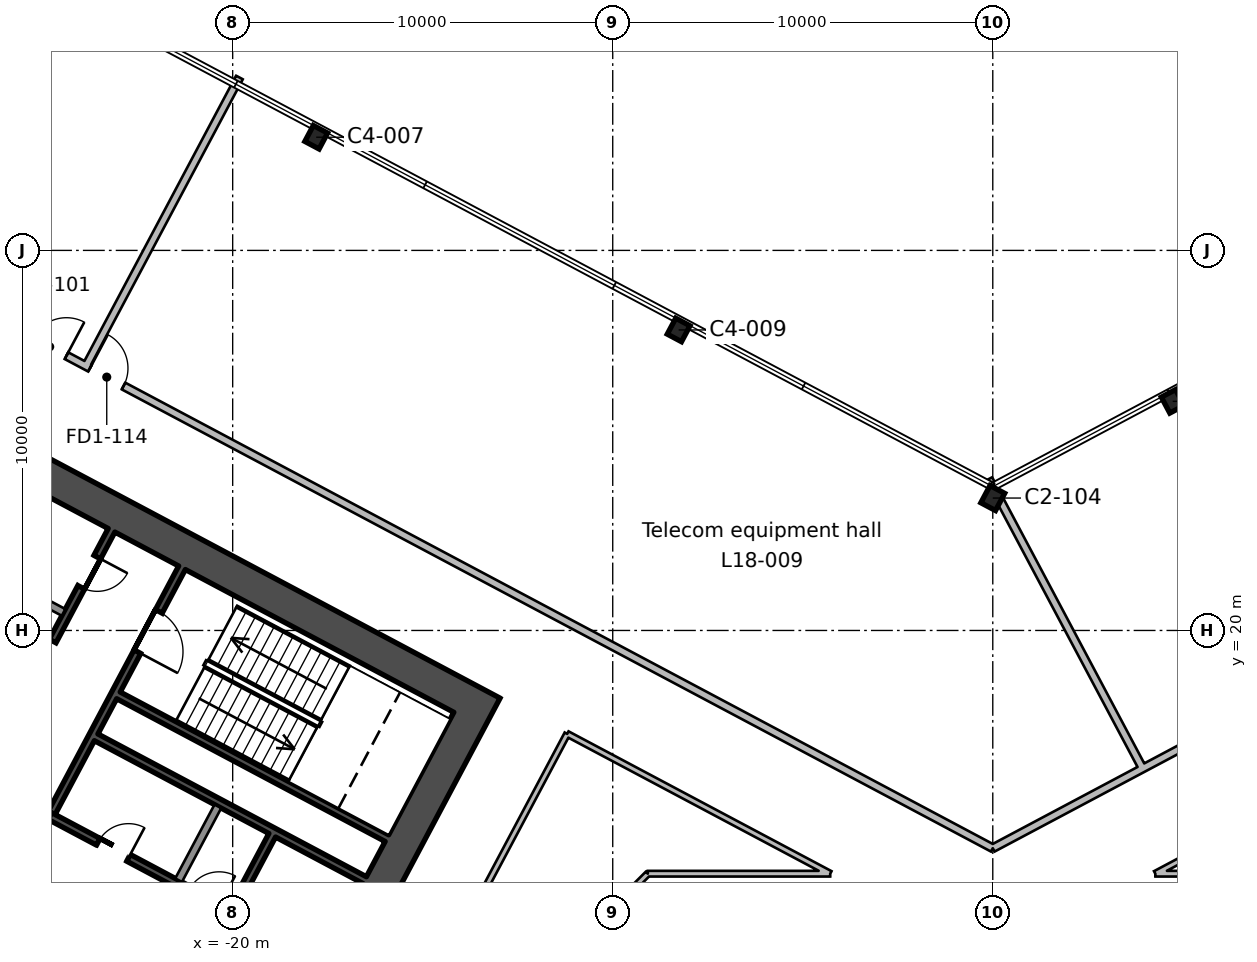
"""IFC4 building model, lengths in metres.
Left out: names, types, materials, properties, quantities, classifications, styles, units other than length and angle.
Written with IfcOpenShell. Run it as: python <this file> out.ifc"""

import sys

from ifc_helpers import new_model, si_unit, direction, frame, frame_2d, origin, origin_2d, place, context, subcontext, project, spatial, rectangle, i_section, extrude, element, fill, save


model = new_model("IFC4")
c1 = context("Model", 3, precision=1e-05, world=origin(), true_north=direction((0.0, 1.0)))
c2 = subcontext(c1, "Body", "Model", "MODEL_VIEW")
j1 = project(units=[si_unit("LENGTHUNIT", "METRE"), si_unit("PLANEANGLEUNIT", "RADIAN")], contexts=[c1])
p1 = place(None, origin())
s1 = spatial("IfcSite", under=j1, at=p1, CompositionType="ELEMENT")
p2 = place(p1, origin())
s2 = spatial("IfcBuilding", under=s1, at=p2, CompositionType="ELEMENT")
p3 = place(p2, frame((0.0, 0.0, 93.8)))
s3 = spatial("IfcBuildingStorey", under=s2, at=p3, CompositionType="ELEMENT", Elevation=93.8)
p4 = place(p3, frame((0.0, 23.484, 0.0), z_axis=(0.0, 0.0, 1.0), x_axis=(-0.882947592859, 0.469471562786, 0.0)))
e1 = element("IfcColumn", 1, at=p4, inside=s3, PredefinedType="COLUMN", context=c2, shape_type="SweptSolid", body=[
    extrude(i_section(OverallWidth=0.437, OverallDepth=0.513, WebThickness=0.061, FlangeThickness=0.097, FilletRadius=0.015, at=origin_2d()), origin(), (0.0, 0.0, 1.0), 4.6),
])
for number, where, z_axis, x_axis in (
    (2, (4.734, 26.029, 0.0), (0.0, 0.0, 1.0), (-0.883, -0.469, 0.0)),
    (3, (-8.266, 27.907, 0.0), (0.0, 0.0, 1.0), (-0.883, 0.469, 0.0)),
    (4, (-17.802, 32.978, 0.0), (0.0, 0.0, 1.0), (-0.883, 0.469, 0.0)),
):
    element("IfcColumn", number, at=place(p3, frame(where, z_axis=z_axis, x_axis=x_axis)), inside=s3, PredefinedType="COLUMN", context=c2, shape_type="SweptSolid", body=[
        extrude(i_section(OverallWidth=0.424, OverallDepth=0.475, WebThickness=0.048, FlangeThickness=0.077, FilletRadius=0.015, at=origin_2d()), origin(), (0.0, 0.0, 1.0), 4.6),
    ])
p5 = place(p3, frame((-13.362, 18.43, 0.0), z_axis=(0.0, 0.0, 1.0), x_axis=(-0.46947084998, -0.882947971864, 0.0)))
e5 = element("IfcWall", 5, at=p5, inside=s3, PredefinedType="SHEAR", context=c2, shape_type="SweptSolid", body=[
    extrude(rectangle(XDim=20.0, YDim=0.9, at=frame_2d((10.0, 0.0))), origin(), (0.0, 0.0, 1.0), 4.6),
])
p6 = place(p5, frame((7.0, 0.0, 0.0)))
e6 = element("IfcOpeningElement", 6, at=p6, cuts=e5, PredefinedType="OPENING", context=c2, shape_type="SweptSolid", body=[
    extrude(rectangle(XDim=2.4, YDim=2.4, at=frame_2d((1.2, 1.2))), frame((0.0, 0.46, 0.0), z_axis=(0.0, -1.0, 0.0), x_axis=(1.0, 0.0, 0.0)), (0.0, 0.0, 1.0), 0.92),
])
p7 = place(p3, frame((-13.97, 18.244, 0.0), z_axis=(0.0, 0.0, 1.0), x_axis=(-0.88294509198, 0.469476266226, 0.0)))
e7 = element("IfcWall", 7, at=p7, inside=s3, PredefinedType="SHEAR", context=c2, shape_type="SweptSolid", body=[
    extrude(rectangle(XDim=20.2, YDim=0.9, at=frame_2d((10.1, 0.0))), origin(), (0.0, 0.0, 1.0), 4.6),
])
p8 = place(p3, frame((-18.96, 14.611, 0.0), z_axis=(0.0, 0.0, 1.0), x_axis=(-0.4694473164, -0.882960484464, 0.0)))
e8 = element("IfcWall", 8, at=p8, inside=s3, PredefinedType="SHEAR", context=c2, shape_type="SweptSolid", body=[
    extrude(rectangle(XDim=2.2, YDim=0.2, at=frame_2d((1.1, 0.0))), origin(), (0.0, 0.0, 1.0), 4.6),
])
p9 = place(p3, frame((-20.39, 15.372, 0.0), z_axis=(0.0, 0.0, 1.0), x_axis=(-0.4694473164, -0.882960484464, 0.0)))
e9 = element("IfcWall", 9, at=p9, inside=s3, PredefinedType="SOLIDWALL", context=c2, shape_type="SweptSolid", body=[
    extrude(rectangle(XDim=2.2, YDim=0.2, at=frame_2d((1.1, 0.0))), origin(), (0.0, 0.0, 1.0), 4.6),
])
p10 = place(p3, frame((-21.333, 21.649, 0.0), z_axis=(0.0, 0.0, 1.0), x_axis=(-0.469494272526, -0.882935517501, 0.0)))
e10 = element("IfcWall", 10, at=p10, inside=s3, PredefinedType="SHEAR", context=c2, shape_type="SweptSolid", body=[
    extrude(rectangle(XDim=7.3, YDim=0.2, at=frame_2d((3.65, 0.0))), origin(), (0.0, 0.0, 1.0), 4.6),
])
p11 = place(p10, frame((1.3, 0.0, 0.0)))
e11 = element("IfcOpeningElement", 11, at=p11, cuts=e10, PredefinedType="OPENING", context=c2, shape_type="SweptSolid", body=[
    extrude(rectangle(XDim=1.2, YDim=2.1, at=frame_2d((0.6, 1.05))), frame((0.0, 0.11, 0.0), z_axis=(0.0, -1.0, 0.0), x_axis=(1.0, 0.0, 0.0)), (0.0, 0.0, 1.0), 0.22),
])
p12 = place(p3, frame((-23.188, 22.635, 0.0), z_axis=(0.0, 0.0, 1.0), x_axis=(-0.469454336211, -0.882956752176, 0.0)))
e12 = element("IfcWall", 12, at=p12, inside=s3, PredefinedType="SHEAR", context=c2, shape_type="SweptSolid", body=[
    extrude(rectangle(XDim=7.3, YDim=0.2, at=frame_2d((3.65, 0.0))), origin(), (0.0, 0.0, 1.0), 4.6),
])
p13 = place(p12, frame((0.8, 0.0, 0.0)))
e13 = element("IfcOpeningElement", 13, at=p13, cuts=e12, PredefinedType="OPENING", context=c2, shape_type="SweptSolid", body=[
    extrude(rectangle(XDim=0.9, YDim=2.1, at=frame_2d((0.45, 1.05))), frame((0.0, 0.11, 0.0), z_axis=(0.0, -1.0, 0.0), x_axis=(1.0, 0.0, 0.0)), (0.0, 0.0, 1.0), 0.22),
])
p14 = place(p12, frame((3.3, 0.0, 0.0)))
e14 = element("IfcOpeningElement", 14, at=p14, cuts=e12, PredefinedType="OPENING", context=c2, shape_type="SweptSolid", body=[
    extrude(rectangle(XDim=0.9, YDim=2.1, at=frame_2d((0.45, 1.05))), frame((0.0, 0.11, 0.0), z_axis=(0.0, -1.0, 0.0), x_axis=(1.0, 0.0, 0.0)), (0.0, 0.0, 1.0), 0.22),
])
p15 = place(p3, frame((-24.449, 20.475, 0.0), z_axis=(0.0, 0.0, 1.0), x_axis=(-0.882934506056, 0.469496174655, 0.0)))
e15 = element("IfcWall", 15, at=p15, inside=s3, PredefinedType="SOLIDWALL", context=c2, shape_type="SweptSolid", body=[
    extrude(rectangle(XDim=5.2, YDim=0.2, at=frame_2d((2.6, 0.0))), origin(), (0.0, 0.0, 1.0), 4.6),
])
p16 = place(p3, frame((-15.942, 14.536, 0.0), z_axis=(0.0, 0.0, 1.0), x_axis=(-0.882946947542, 0.469472776449, 0.0)))
e16 = element("IfcWall", 16, at=p16, inside=s3, PredefinedType="SHEAR", context=c2, shape_type="SweptSolid", body=[
    extrude(rectangle(XDim=8.0, YDim=0.2, at=frame_2d((4.0, 0.0))), origin(), (0.0, 0.0, 1.0), 4.6),
])
p17 = place(p3, frame((-16.529, 13.432, 0.0), z_axis=(0.0, 0.0, 1.0), x_axis=(-0.88295287151, 0.469461634952, 0.0)))
e17 = element("IfcWall", 17, at=p17, inside=s3, PredefinedType="SHEAR", context=c2, shape_type="SweptSolid", body=[
    extrude(rectangle(XDim=8.0, YDim=0.2, at=frame_2d((4.0, 0.0))), origin(), (0.0, 0.0, 1.0), 4.6),
])
p18 = place(p3, frame((-20.04, 12.581, 0.0), z_axis=(0.0, 0.0, 1.0), x_axis=(-0.882942972946, 0.469480251476, 0.0)))
e18 = element("IfcWall", 18, at=p18, inside=s3, PredefinedType="SHEAR", context=c2, shape_type="SweptSolid", body=[
    extrude(rectangle(XDim=5.4, YDim=0.2, at=frame_2d((2.7, 0.0))), origin(), (0.0, 0.0, 1.0), 4.6),
])
p19 = place(p18, frame((0.36, 0.0, 0.0)))
e19 = element("IfcOpeningElement", 19, at=p19, cuts=e18, PredefinedType="OPENING", context=c2, shape_type="SweptSolid", body=[
    extrude(rectangle(XDim=0.9, YDim=2.1, at=frame_2d((0.45, 1.05))), frame((0.0, 0.11, 0.0), z_axis=(0.0, -1.0, 0.0), x_axis=(1.0, 0.0, 0.0)), (0.0, 0.0, 1.0), 0.22),
])
p20 = place(p18, frame((3.06, 0.0, 0.0)))
e20 = element("IfcOpeningElement", 20, at=p20, cuts=e18, PredefinedType="OPENING", context=c2, shape_type="SweptSolid", body=[
    extrude(rectangle(XDim=0.9, YDim=2.1, at=frame_2d((0.45, 1.05))), frame((0.0, 0.11, 0.0), z_axis=(0.0, -1.0, 0.0), x_axis=(1.0, 0.0, 0.0)), (0.0, 0.0, 1.0), 0.22),
])
p21 = place(p3, frame((-48.271, 39.936, 0.0), z_axis=(0.0, 0.0, 1.0), x_axis=(0.88294856545, -0.469469733604, 0.0)))
e21 = element("IfcWall", 21, at=p21, inside=s3, PredefinedType="PARTITIONING", context=c2, shape_type="SweptSolid", body=[
    extrude(rectangle(XDim=54.67, YDim=0.2, at=frame_2d((27.335, 0.0))), origin(), (0.0, 0.0, 1.0), 4.2),
])
p22 = place(p21, frame((27.766, 0.0, 0.0)))
e22 = element("IfcOpeningElement", 22, at=p22, cuts=e21, PredefinedType="OPENING", context=c2, shape_type="SweptSolid", body=[
    extrude(rectangle(XDim=1.0, YDim=2.1, at=frame_2d((0.5, 1.05))), frame((0.0, 0.11, 0.0), z_axis=(0.0, -1.0, 0.0), x_axis=(1.0, 0.0, 0.0)), (0.0, 0.0, 1.0), 0.22),
])
p23 = place(p21, frame((26.066, 0.0, 0.0)))
e23 = element("IfcOpeningElement", 23, at=p23, cuts=e21, PredefinedType="OPENING", context=c2, shape_type="SweptSolid", body=[
    extrude(rectangle(XDim=1.0, YDim=2.1, at=frame_2d((0.5, 1.05))), frame((0.0, 0.11, 0.0), z_axis=(0.0, -1.0, 0.0), x_axis=(1.0, 0.0, 0.0)), (0.0, 0.0, 1.0), 0.22),
])
p24 = place(p21, frame((15.265, 0.0, 0.0)))
e24 = element("IfcOpeningElement", 24, at=p24, cuts=e21, PredefinedType="OPENING", context=c2, shape_type="SweptSolid", body=[
    extrude(rectangle(XDim=1.0, YDim=2.1, at=frame_2d((0.5, 1.05))), frame((0.0, 0.11, 0.0), z_axis=(0.0, -1.0, 0.0), x_axis=(1.0, 0.0, 0.0)), (0.0, 0.0, 1.0), 0.22),
])
p25 = place(p3, frame((0.0, 14.27, 0.0), z_axis=(0.0, 0.0, 1.0), x_axis=(0.882946949892, 0.46947277203, 0.0)))
e25 = element("IfcWall", 25, at=p25, inside=s3, PredefinedType="PARTITIONING", context=c2, shape_type="SweptSolid", body=[
    extrude(rectangle(XDim=65.501, YDim=0.2, at=frame_2d((32.75, 0.0))), origin(), (0.0, 0.0, 1.0), 4.2),
])
p26 = place(p25, frame((35.45, 0.0, 0.0)))
e26 = element("IfcOpeningElement", 26, at=p26, cuts=e25, PredefinedType="OPENING", context=c2, shape_type="SweptSolid", body=[
    extrude(rectangle(XDim=1.0, YDim=2.1, at=frame_2d((0.5, 1.05))), frame((0.0, 0.11, 0.0), z_axis=(0.0, -1.0, 0.0), x_axis=(1.0, 0.0, 0.0)), (0.0, 0.0, 1.0), 0.22),
])
p27 = place(p25, frame((32.05, 0.0, 0.0)))
e27 = element("IfcOpeningElement", 27, at=p27, cuts=e25, PredefinedType="OPENING", context=c2, shape_type="SweptSolid", body=[
    extrude(rectangle(XDim=1.0, YDim=2.1, at=frame_2d((0.5, 1.05))), frame((0.0, 0.11, 0.0), z_axis=(0.0, -1.0, 0.0), x_axis=(1.0, 0.0, 0.0)), (0.0, 0.0, 1.0), 0.22),
])
p28 = place(p25, frame((29.65, 0.0, 0.0)))
e28 = element("IfcOpeningElement", 28, at=p28, cuts=e25, PredefinedType="OPENING", context=c2, shape_type="SweptSolid", body=[
    extrude(rectangle(XDim=1.0, YDim=2.1, at=frame_2d((0.5, 1.05))), frame((0.0, 0.11, 0.0), z_axis=(0.0, -1.0, 0.0), x_axis=(1.0, 0.0, 0.0)), (0.0, 0.0, 1.0), 0.22),
])
p29 = place(p25, frame((13.85, 0.0, 0.0)))
e29 = element("IfcOpeningElement", 29, at=p29, cuts=e25, PredefinedType="OPENING", context=c2, shape_type="SweptSolid", body=[
    extrude(rectangle(XDim=1.0, YDim=2.1, at=frame_2d((0.5, 1.05))), frame((0.0, 0.11, 0.0), z_axis=(0.0, -1.0, 0.0), x_axis=(1.0, 0.0, 0.0)), (0.0, 0.0, 1.0), 0.22),
])
p30 = place(p3, frame((-19.822, 34.55, 0.0), z_axis=(0.0, 0.0, 1.0), x_axis=(-0.469434046176, -0.882967539772, 0.0)))
e30 = element("IfcWall", 30, at=p30, inside=s3, PredefinedType="PARTITIONING", context=c2, shape_type="SweptSolid", body=[
    extrude(rectangle(XDim=8.599, YDim=0.2, at=frame_2d((4.3, 0.0))), origin(), (0.0, 0.0, 1.0), 4.2),
])
p31 = place(p3, frame((-0.105, 23.984, 0.0), z_axis=(0.0, 0.0, 1.0), x_axis=(0.46938766067, -0.882992199292, 0.0)))
e31 = element("IfcWall", 31, at=p31, inside=s3, PredefinedType="PARTITIONING", context=c2, shape_type="SweptSolid", body=[
    extrude(rectangle(XDim=8.626, YDim=0.2, at=frame_2d((4.313, 0.0))), origin(), (0.0, 0.0, 1.0), 4.2),
])
p32 = place(p3, frame((-20.588, -0.379, 0.0), z_axis=(0.0, 0.0, 1.0), x_axis=(0.469489882812, 0.882937851685, 0.0)))
e32 = element("IfcWall", 32, at=p32, inside=s3, PredefinedType="PARTITIONING", context=c2, shape_type="SweptSolid", body=[
    extrude(rectangle(XDim=20.0, YDim=0.15, at=frame_2d((10.0, 0.0))), origin(), (0.0, 0.0, 1.0), 4.2),
])
p33 = place(p32, frame((9.55, 0.0, 0.0)))
e33 = element("IfcOpeningElement", 33, at=p33, cuts=e32, PredefinedType="OPENING", context=c2, shape_type="SweptSolid", body=[
    extrude(rectangle(XDim=1.0, YDim=2.1, at=frame_2d((0.5, 1.05))), frame((0.0, 0.085, 0.0), z_axis=(0.0, -1.0, 0.0), x_axis=(1.0, 0.0, 0.0)), (0.0, 0.0, 1.0), 0.17),
])
p34 = place(p3, frame((-11.198, 17.28, 0.0), z_axis=(0.0, 0.0, 1.0), x_axis=(0.882946288452, -0.46947401601, 0.0)))
e34 = element("IfcWall", 34, at=p34, inside=s3, PredefinedType="PARTITIONING", context=c2, shape_type="SweptSolid", body=[
    extrude(rectangle(XDim=7.838, YDim=0.15, at=frame_2d((3.919, 0.0))), origin(), (0.0, 0.0, 1.0), 4.2),
])
p35 = place(p3, frame((-4.277, 13.6, 0.0), z_axis=(0.0, 0.0, 1.0), x_axis=(-1.0, 0.0, 0.0)))
e35 = element("IfcWall", 35, at=p35, inside=s3, PredefinedType="PARTITIONING", context=c2, shape_type="SweptSolid", body=[
    extrude(rectangle(XDim=4.8, YDim=0.15, at=frame_2d((2.4, 0.0))), origin(), (0.0, 0.0, 1.0), 4.2),
])
p36 = place(p3, frame((-9.077, 13.6, 0.0), z_axis=(0.0, 0.0, 1.0), x_axis=(-0.707106781187, -0.707106781187, 0.0)))
e36 = element("IfcWall", 36, at=p36, inside=s3, PredefinedType="PARTITIONING", context=c2, shape_type="SweptSolid", body=[
    extrude(rectangle(XDim=6.397, YDim=0.15, at=frame_2d((3.198, 0.0))), origin(), (0.0, 0.0, 1.0), 4.2),
])
p37 = place(p3, frame((4.277, 13.6, 0.0), z_axis=(0.0, 0.0, 1.0), x_axis=(1.0, 0.0, 0.0)))
e37 = element("IfcWall", 37, at=p37, inside=s3, PredefinedType="PARTITIONING", context=c2, shape_type="SweptSolid", body=[
    extrude(rectangle(XDim=4.348, YDim=0.15, at=frame_2d((2.174, 0.0))), origin(), (0.0, 0.0, 1.0), 4.2),
])
p38 = place(p3, frame((7.667, 15.402, 0.0), z_axis=(0.0, 0.0, 1.0), x_axis=(-0.882994654303, -0.469383042378, 0.0)))
e38 = element("IfcWall", 38, at=p38, inside=s3, PredefinedType="PARTITIONING", context=c2, shape_type="SweptSolid", body=[
    extrude(rectangle(XDim=3.839, YDim=0.15, at=frame_2d((1.919, 0.0))), origin(), (0.0, 0.0, 1.0), 4.2),
])
p39 = place(p11, origin())
e39 = element("IfcDoor", 39, at=p39, inside=s3, OperationType="SINGLE_SWING_RIGHT", PredefinedType="DOOR", context=c2, shape_type="SweptSolid", body=[
    extrude(rectangle(XDim=1.2, YDim=2.1, at=frame_2d((0.6, 1.05))), frame((0.0, 0.025, 0.0), z_axis=(0.0, -1.0, 0.0), x_axis=(1.0, 0.0, 0.0)), (0.0, 0.0, 1.0), 0.05),
])
fill(e11, e39)
p40 = place(p20, frame((0.9, 0.0, 0.0), z_axis=(0.0, 0.0, 1.0), x_axis=(-1.0, 0.0, 0.0)))
e40 = element("IfcDoor", 40, at=p40, inside=s3, OperationType="SINGLE_SWING_RIGHT", PredefinedType="DOOR", context=c2, shape_type="SweptSolid", body=[
    extrude(rectangle(XDim=0.9, YDim=2.1, at=frame_2d((0.45, 1.05))), frame((0.0, 0.025, 0.0), z_axis=(0.0, -1.0, 0.0), x_axis=(1.0, 0.0, 0.0)), (0.0, 0.0, 1.0), 0.05),
])
fill(e20, e40)
p41 = place(p13, origin())
e41 = element("IfcDoor", 41, at=p41, inside=s3, OperationType="SINGLE_SWING_LEFT", PredefinedType="DOOR", context=c2, shape_type="SweptSolid", body=[
    extrude(rectangle(XDim=0.9, YDim=2.1, at=frame_2d((0.45, 1.05))), frame((0.0, 0.025, 0.0), z_axis=(0.0, -1.0, 0.0), x_axis=(1.0, 0.0, 0.0)), (0.0, 0.0, 1.0), 0.05),
])
fill(e13, e41)
p42 = place(p14, frame((0.9, 0.0, 0.0), z_axis=(0.0, 0.0, 1.0), x_axis=(-1.0, 0.0, 0.0)))
e42 = element("IfcDoor", 42, at=p42, inside=s3, OperationType="SINGLE_SWING_RIGHT", PredefinedType="DOOR", context=c2, shape_type="SweptSolid", body=[
    extrude(rectangle(XDim=0.9, YDim=2.1, at=frame_2d((0.45, 1.05))), frame((0.0, 0.025, 0.0), z_axis=(0.0, -1.0, 0.0), x_axis=(1.0, 0.0, 0.0)), (0.0, 0.0, 1.0), 0.05),
])
fill(e14, e42)
p43 = place(p22, origin())
e43 = element("IfcDoor", 43, at=p43, inside=s3, OperationType="SINGLE_SWING_LEFT", PredefinedType="DOOR", context=c2, shape_type="SweptSolid", body=[
    extrude(rectangle(XDim=1.0, YDim=2.1, at=frame_2d((0.5, 1.05))), frame((0.0, 0.025, 0.0), z_axis=(0.0, -1.0, 0.0), x_axis=(1.0, 0.0, 0.0)), (0.0, 0.0, 1.0), 0.05),
])
fill(e22, e43)
p44 = place(p23, origin())
e44 = element("IfcDoor", 44, at=p44, inside=s3, OperationType="SINGLE_SWING_RIGHT", PredefinedType="DOOR", context=c2, shape_type="SweptSolid", body=[
    extrude(rectangle(XDim=1.0, YDim=2.1, at=frame_2d((0.5, 1.05))), frame((0.0, 0.025, 0.0), z_axis=(0.0, -1.0, 0.0), x_axis=(1.0, 0.0, 0.0)), (0.0, 0.0, 1.0), 0.05),
])
fill(e23, e44)
save(model, sys.argv[1])
